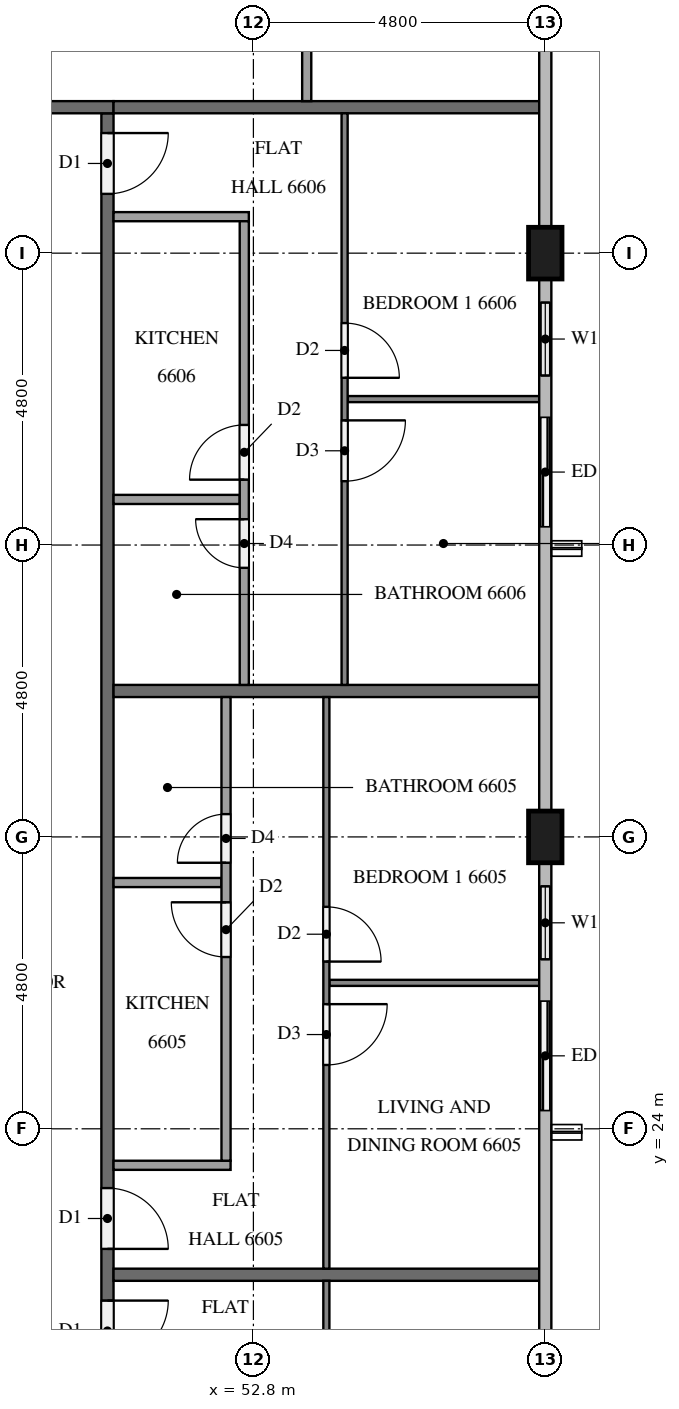
"""IFC4 building model, lengths in metres.
Left out: names, types, materials, properties, quantities, classifications, styles, units other than length and angle.
Written with IfcOpenShell. Run it as: python <this file> out.ifc"""

import sys

from ifc_helpers import new_model, si_unit, direction, frame, frame_2d, origin, origin_2d, place, context, subcontext, project, spatial, rectangle, extrude, element, fill, save


model = new_model("IFC4")
c1 = context("Model", 3, precision=1e-05, world=origin(), true_north=direction((0.0, 1.0)))
c2 = subcontext(c1, "Body", "Model", "MODEL_VIEW")
j1 = project(units=[si_unit("LENGTHUNIT", "METRE"), si_unit("PLANEANGLEUNIT", "RADIAN")], contexts=[c1])
p1 = place(None, origin())
s1 = spatial("IfcSite", under=j1, at=p1, CompositionType="ELEMENT")
p2 = place(p1, origin())
s2 = spatial("IfcBuilding", under=s1, at=p2, CompositionType="ELEMENT")
p3 = place(p2, frame((0.0, 0.0, 252.7)))
s3 = spatial("IfcBuildingStorey", under=s2, at=p3, CompositionType="ELEMENT", Elevation=252.7)
for number, where, z_axis, x_axis in (
    (1, (57.6, 28.8, 0.0), (0.0, 0.0, 1.0), (0.0, 1.0, 0.0)),
    (2, (57.6, 38.4, 0.0), (0.0, 0.0, 1.0), (0.0, 1.0, 0.0)),
):
    element("IfcColumn", number, at=place(p3, frame(where, z_axis=z_axis, x_axis=x_axis)), inside=s3, PredefinedType="COLUMN", context=c2, shape_type="SweptSolid", body=[
        extrude(rectangle(XDim=0.85, YDim=0.55, at=origin_2d()), origin(), (0.0, 0.0, 1.0), 3.2),
    ])
p4 = place(p3, frame((57.6, 24.0, 0.0), z_axis=(0.0, 0.0, 1.0), x_axis=(0.0, 1.0, 0.0)))
e3 = element("IfcWall", 3, at=p4, inside=s3, PredefinedType="SOLIDWALL", context=c2, shape_type="SweptSolid", body=[
    extrude(rectangle(XDim=4.375, YDim=0.15, at=frame_2d((2.188, 0.0))), origin(), (0.0, 0.0, 1.0), 3.2),
])
p5 = place(p4, frame((0.3, 0.0, 0.0)))
e4 = element("IfcOpeningElement", 4, at=p5, cuts=e3, PredefinedType="OPENING", context=c2, shape_type="SweptSolid", body=[
    extrude(rectangle(XDim=1.8, YDim=2.4, at=frame_2d((0.9, 1.2))), frame((0.0, 0.085, 0.0), z_axis=(0.0, -1.0, 0.0), x_axis=(1.0, 0.0, 0.0)), (0.0, 0.0, 1.0), 0.17),
])
p6 = place(p4, frame((2.788, 0.0, 0.9)))
e5 = element("IfcOpeningElement", 5, at=p6, cuts=e3, PredefinedType="OPENING", context=c2, shape_type="SweptSolid", body=[
    extrude(rectangle(XDim=1.2, YDim=1.4, at=frame_2d((0.6, 0.7))), frame((0.0, 0.085, 0.0), z_axis=(0.0, -1.0, 0.0), x_axis=(1.0, 0.0, 0.0)), (0.0, 0.0, 1.0), 0.17),
])
p7 = place(p3, frame((57.6, 33.6, 0.0), z_axis=(0.0, 0.0, 1.0), x_axis=(0.0, 1.0, 0.0)))
e6 = element("IfcWall", 6, at=p7, inside=s3, PredefinedType="SOLIDWALL", context=c2, shape_type="SweptSolid", body=[
    extrude(rectangle(XDim=4.375, YDim=0.15, at=frame_2d((2.188, 0.0))), origin(), (0.0, 0.0, 1.0), 3.2),
])
p8 = place(p7, frame((0.3, 0.0, 0.0)))
e7 = element("IfcOpeningElement", 7, at=p8, cuts=e6, PredefinedType="OPENING", context=c2, shape_type="SweptSolid", body=[
    extrude(rectangle(XDim=1.8, YDim=2.4, at=frame_2d((0.9, 1.2))), frame((0.0, 0.085, 0.0), z_axis=(0.0, -1.0, 0.0), x_axis=(1.0, 0.0, 0.0)), (0.0, 0.0, 1.0), 0.17),
])
p9 = place(p7, frame((2.788, 0.0, 0.9)))
e8 = element("IfcOpeningElement", 8, at=p9, cuts=e6, PredefinedType="OPENING", context=c2, shape_type="SweptSolid", body=[
    extrude(rectangle(XDim=1.2, YDim=1.4, at=frame_2d((0.6, 0.7))), frame((0.0, 0.085, 0.0), z_axis=(0.0, -1.0, 0.0), x_axis=(1.0, 0.0, 0.0)), (0.0, 0.0, 1.0), 0.17),
])
p10 = place(p3, frame((50.4, 40.7, 0.0), z_axis=(0.0, 0.0, 1.0), x_axis=(0.0, -1.0, 0.0)))
e9 = element("IfcWall", 9, at=p10, inside=s3, PredefinedType="PARTITIONING", context=c2, shape_type="SweptSolid", body=[
    extrude(rectangle(XDim=28.6, YDim=0.2, at=frame_2d((14.3, 0.0))), origin(), (0.0, 0.0, 1.0), 3.2),
])
p11 = place(p10, frame((19.525, 0.0, 0.0)))
e10 = element("IfcOpeningElement", 10, at=p11, cuts=e9, PredefinedType="OPENING", context=c2, shape_type="SweptSolid", body=[
    extrude(rectangle(XDim=1.0, YDim=2.1, at=frame_2d((0.5, 1.05))), frame((0.0, 0.11, 0.0), z_axis=(0.0, -1.0, 0.0), x_axis=(1.0, 0.0, 0.0)), (0.0, 0.0, 1.0), 0.22),
])
p12 = place(p10, frame((17.675, 0.0, 0.0)))
e11 = element("IfcOpeningElement", 11, at=p12, cuts=e9, PredefinedType="OPENING", context=c2, shape_type="SweptSolid", body=[
    extrude(rectangle(XDim=1.0, YDim=2.1, at=frame_2d((0.5, 1.05))), frame((0.0, 0.11, 0.0), z_axis=(0.0, -1.0, 0.0), x_axis=(1.0, 0.0, 0.0)), (0.0, 0.0, 1.0), 0.22),
])
p13 = place(p10, frame((0.325, 0.0, 0.0)))
e12 = element("IfcOpeningElement", 12, at=p13, cuts=e9, PredefinedType="OPENING", context=c2, shape_type="SweptSolid", body=[
    extrude(rectangle(XDim=1.0, YDim=2.1, at=frame_2d((0.5, 1.05))), frame((0.0, 0.11, 0.0), z_axis=(0.0, -1.0, 0.0), x_axis=(1.0, 0.0, 0.0)), (0.0, 0.0, 1.0), 0.22),
])
p14 = place(p3, frame((11.9, 40.8, 0.0), z_axis=(0.0, 0.0, 1.0), x_axis=(1.0, 0.0, 0.0)))
e13 = element("IfcWall", 13, at=p14, inside=s3, PredefinedType="PARTITIONING", context=c2, shape_type="SweptSolid", body=[
    extrude(rectangle(XDim=38.6, YDim=0.2, at=frame_2d((19.3, 0.0))), origin(), (0.0, 0.0, 1.0), 3.2),
])
p15 = place(p14, frame((31.725, 0.0, 0.0)))
e14 = element("IfcOpeningElement", 14, at=p15, cuts=e13, PredefinedType="OPENING", context=c2, shape_type="SweptSolid", body=[
    extrude(rectangle(XDim=1.0, YDim=2.1, at=frame_2d((0.5, 1.05))), frame((0.0, 0.11, 0.0), z_axis=(0.0, -1.0, 0.0), x_axis=(1.0, 0.0, 0.0)), (0.0, 0.0, 1.0), 0.22),
])
p16 = place(p14, frame((17.325, 0.0, 0.0)))
e15 = element("IfcOpeningElement", 15, at=p16, cuts=e13, PredefinedType="OPENING", context=c2, shape_type="SweptSolid", body=[
    extrude(rectangle(XDim=1.0, YDim=2.1, at=frame_2d((0.5, 1.05))), frame((0.0, 0.11, 0.0), z_axis=(0.0, -1.0, 0.0), x_axis=(1.0, 0.0, 0.0)), (0.0, 0.0, 1.0), 0.22),
])
p17 = place(p14, frame((0.525, 0.0, 0.0)))
e16 = element("IfcOpeningElement", 16, at=p17, cuts=e13, PredefinedType="OPENING", context=c2, shape_type="SweptSolid", body=[
    extrude(rectangle(XDim=1.0, YDim=2.1, at=frame_2d((0.5, 1.05))), frame((0.0, 0.11, 0.0), z_axis=(0.0, -1.0, 0.0), x_axis=(1.0, 0.0, 0.0)), (0.0, 0.0, 1.0), 0.22),
])
for number, where, z_axis, x_axis in (
    (17, (50.5, 21.6, 0.0), (0.0, 0.0, 1.0), (1.0, 0.0, 0.0)),
    (18, (50.5, 31.2, 0.0), (0.0, 0.0, 1.0), (1.0, 0.0, 0.0)),
    (19, (50.5, 40.8, 0.0), (0.0, 0.0, 1.0), (1.0, 0.0, 0.0)),
):
    element("IfcWall", number, at=place(p3, frame(where, z_axis=z_axis, x_axis=x_axis)), inside=s3, PredefinedType="PARTITIONING", context=c2, shape_type="SweptSolid", body=[
        extrude(rectangle(XDim=7.0, YDim=0.2, at=frame_2d((3.5, 0.0))), origin(), (0.0, 0.0, 1.0), 3.2),
    ])
p18 = place(p3, frame((54.0, 21.5, 0.0), z_axis=(0.0, 0.0, 1.0), x_axis=(0.0, -1.0, 0.0)))
e20 = element("IfcWall", 20, at=p18, inside=s3, PredefinedType="PARTITIONING", context=c2, shape_type="SweptSolid", body=[
    extrude(rectangle(XDim=16.279, YDim=0.1, at=frame_2d((8.139, 0.0))), origin(), (0.0, 0.0, 1.0), 3.2),
])
p19 = place(p18, frame((3.45, 0.0, 0.0)))
e21 = element("IfcOpeningElement", 21, at=p19, cuts=e20, PredefinedType="OPENING", context=c2, shape_type="SweptSolid", body=[
    extrude(rectangle(XDim=0.9, YDim=2.1, at=frame_2d((0.45, 1.05))), frame((0.0, 0.06, 0.0), z_axis=(0.0, -1.0, 0.0), x_axis=(1.0, 0.0, 0.0)), (0.0, 0.0, 1.0), 0.12),
])
p20 = place(p18, frame((5.05, 0.0, 0.0)))
e22 = element("IfcOpeningElement", 22, at=p20, cuts=e20, PredefinedType="OPENING", context=c2, shape_type="SweptSolid", body=[
    extrude(rectangle(XDim=0.9, YDim=2.1, at=frame_2d((0.45, 1.05))), frame((0.0, 0.06, 0.0), z_axis=(0.0, -1.0, 0.0), x_axis=(1.0, 0.0, 0.0)), (0.0, 0.0, 1.0), 0.12),
])
p21 = place(p18, frame((14.979, 0.0, 0.0)))
e23 = element("IfcOpeningElement", 23, at=p21, cuts=e20, PredefinedType="OPENING", context=c2, shape_type="SweptSolid", body=[
    extrude(rectangle(XDim=1.0, YDim=2.1, at=frame_2d((0.5, 1.05))), frame((0.0, 0.06, 0.0), z_axis=(0.0, -1.0, 0.0), x_axis=(1.0, 0.0, 0.0)), (0.0, 0.0, 1.0), 0.12),
])
p22 = place(p3, frame((54.05, 26.4, 0.0), z_axis=(0.0, 0.0, 1.0), x_axis=(1.0, 0.0, 0.0)))
e24 = element("IfcWall", 24, at=p22, inside=s3, PredefinedType="PARTITIONING", context=c2, shape_type="SweptSolid", body=[
    extrude(rectangle(XDim=3.45, YDim=0.1, at=frame_2d((1.725, 0.0))), origin(), (0.0, 0.0, 1.0), 3.2),
])
p23 = place(p3, frame((54.0, 31.1, 0.0), z_axis=(0.0, 0.0, 1.0), x_axis=(0.0, -1.0, 0.0)))
e25 = element("IfcWall", 25, at=p23, inside=s3, PredefinedType="PARTITIONING", context=c2, shape_type="SweptSolid", body=[
    extrude(rectangle(XDim=9.4, YDim=0.1, at=frame_2d((4.7, 0.0))), origin(), (0.0, 0.0, 1.0), 3.2),
])
p24 = place(p23, frame((5.05, 0.0, 0.0)))
e26 = element("IfcOpeningElement", 26, at=p24, cuts=e25, PredefinedType="OPENING", context=c2, shape_type="SweptSolid", body=[
    extrude(rectangle(XDim=1.0, YDim=2.1, at=frame_2d((0.5, 1.05))), frame((0.0, 0.06, 0.0), z_axis=(0.0, -1.0, 0.0), x_axis=(1.0, 0.0, 0.0)), (0.0, 0.0, 1.0), 0.12),
])
p25 = place(p23, frame((3.45, 0.0, 0.0)))
e27 = element("IfcOpeningElement", 27, at=p25, cuts=e25, PredefinedType="OPENING", context=c2, shape_type="SweptSolid", body=[
    extrude(rectangle(XDim=0.9, YDim=2.1, at=frame_2d((0.45, 1.05))), frame((0.0, 0.06, 0.0), z_axis=(0.0, -1.0, 0.0), x_axis=(1.0, 0.0, 0.0)), (0.0, 0.0, 1.0), 0.12),
])
p26 = place(p3, frame((50.5, 28.05, 0.0), z_axis=(0.0, 0.0, 1.0), x_axis=(1.0, 0.0, 0.0)))
e28 = element("IfcWall", 28, at=p26, inside=s3, PredefinedType="PARTITIONING", context=c2, shape_type="SweptSolid", body=[
    extrude(rectangle(XDim=1.775, YDim=0.15, at=frame_2d((0.887, 0.0))), origin(), (0.0, 0.0, 1.0), 3.2),
])
p27 = place(p3, frame((50.5, 23.4, 0.0), z_axis=(0.0, 0.0, 1.0), x_axis=(1.0, 0.0, 0.0)))
e29 = element("IfcWall", 29, at=p27, inside=s3, PredefinedType="PARTITIONING", context=c2, shape_type="SweptSolid", body=[
    extrude(rectangle(XDim=1.925, YDim=0.15, at=frame_2d((0.962, 0.0))), origin(), (0.0, 0.0, 1.0), 3.2),
])
p28 = place(p3, frame((52.35, 23.475, 0.0), z_axis=(0.0, 0.0, 1.0), x_axis=(0.0, 1.0, 0.0)))
e30 = element("IfcWall", 30, at=p28, inside=s3, PredefinedType="PARTITIONING", context=c2, shape_type="SweptSolid", body=[
    extrude(rectangle(XDim=7.625, YDim=0.15, at=frame_2d((3.812, 0.0))), origin(), (0.0, 0.0, 1.0), 3.2),
])
p29 = place(p28, frame((3.35, 0.0, 0.0)))
e31 = element("IfcOpeningElement", 31, at=p29, cuts=e30, PredefinedType="OPENING", context=c2, shape_type="SweptSolid", body=[
    extrude(rectangle(XDim=0.9, YDim=2.1, at=frame_2d((0.45, 1.05))), frame((0.0, 0.085, 0.0), z_axis=(0.0, -1.0, 0.0), x_axis=(1.0, 0.0, 0.0)), (0.0, 0.0, 1.0), 0.17),
])
p30 = place(p28, frame((4.9, 0.0, 0.0)))
e32 = element("IfcOpeningElement", 32, at=p30, cuts=e30, PredefinedType="OPENING", context=c2, shape_type="SweptSolid", body=[
    extrude(rectangle(XDim=0.8, YDim=2.1, at=frame_2d((0.4, 1.05))), frame((0.0, 0.085, 0.0), z_axis=(0.0, -1.0, 0.0), x_axis=(1.0, 0.0, 0.0)), (0.0, 0.0, 1.0), 0.17),
])
p31 = place(p3, frame((54.35, 36.0, 0.0), z_axis=(0.0, 0.0, 1.0), x_axis=(1.0, 0.0, 0.0)))
e33 = element("IfcWall", 33, at=p31, inside=s3, PredefinedType="PARTITIONING", context=c2, shape_type="SweptSolid", body=[
    extrude(rectangle(XDim=3.15, YDim=0.1, at=frame_2d((1.575, 0.0))), origin(), (0.0, 0.0, 1.0), 3.2),
])
p32 = place(p3, frame((54.3, 40.7, 0.0), z_axis=(0.0, 0.0, 1.0), x_axis=(0.0, -1.0, 0.0)))
e34 = element("IfcWall", 34, at=p32, inside=s3, PredefinedType="PARTITIONING", context=c2, shape_type="SweptSolid", body=[
    extrude(rectangle(XDim=9.4, YDim=0.1, at=frame_2d((4.7, 0.0))), origin(), (0.0, 0.0, 1.0), 3.2),
])
p33 = place(p32, frame((3.45, 0.0, 0.0)))
e35 = element("IfcOpeningElement", 35, at=p33, cuts=e34, PredefinedType="OPENING", context=c2, shape_type="SweptSolid", body=[
    extrude(rectangle(XDim=0.9, YDim=2.1, at=frame_2d((0.45, 1.05))), frame((0.0, 0.06, 0.0), z_axis=(0.0, -1.0, 0.0), x_axis=(1.0, 0.0, 0.0)), (0.0, 0.0, 1.0), 0.12),
])
p34 = place(p32, frame((5.05, 0.0, 0.0)))
e36 = element("IfcOpeningElement", 36, at=p34, cuts=e34, PredefinedType="OPENING", context=c2, shape_type="SweptSolid", body=[
    extrude(rectangle(XDim=1.0, YDim=2.1, at=frame_2d((0.5, 1.05))), frame((0.0, 0.06, 0.0), z_axis=(0.0, -1.0, 0.0), x_axis=(1.0, 0.0, 0.0)), (0.0, 0.0, 1.0), 0.12),
])
p35 = place(p3, frame((50.5, 34.35, 0.0), z_axis=(0.0, 0.0, 1.0), x_axis=(1.0, 0.0, 0.0)))
e37 = element("IfcWall", 37, at=p35, inside=s3, PredefinedType="PARTITIONING", context=c2, shape_type="SweptSolid", body=[
    extrude(rectangle(XDim=2.075, YDim=0.15, at=frame_2d((1.038, 0.0))), origin(), (0.0, 0.0, 1.0), 3.2),
])
p36 = place(p3, frame((50.5, 39.0, 0.0), z_axis=(0.0, 0.0, 1.0), x_axis=(1.0, 0.0, 0.0)))
e38 = element("IfcWall", 38, at=p36, inside=s3, PredefinedType="PARTITIONING", context=c2, shape_type="SweptSolid", body=[
    extrude(rectangle(XDim=2.225, YDim=0.15, at=frame_2d((1.113, 0.0))), origin(), (0.0, 0.0, 1.0), 3.2),
])
p37 = place(p3, frame((52.65, 31.3, 0.0), z_axis=(0.0, 0.0, 1.0), x_axis=(0.0, 1.0, 0.0)))
e39 = element("IfcWall", 39, at=p37, inside=s3, PredefinedType="PARTITIONING", context=c2, shape_type="SweptSolid", body=[
    extrude(rectangle(XDim=7.625, YDim=0.15, at=frame_2d((3.812, 0.0))), origin(), (0.0, 0.0, 1.0), 3.2),
])
p38 = place(p37, frame((3.375, 0.0, 0.0)))
e40 = element("IfcOpeningElement", 40, at=p38, cuts=e39, PredefinedType="OPENING", context=c2, shape_type="SweptSolid", body=[
    extrude(rectangle(XDim=0.9, YDim=2.1, at=frame_2d((0.45, 1.05))), frame((0.0, 0.085, 0.0), z_axis=(0.0, -1.0, 0.0), x_axis=(1.0, 0.0, 0.0)), (0.0, 0.0, 1.0), 0.17),
])
p39 = place(p37, frame((1.925, 0.0, 0.0)))
e41 = element("IfcOpeningElement", 41, at=p39, cuts=e39, PredefinedType="OPENING", context=c2, shape_type="SweptSolid", body=[
    extrude(rectangle(XDim=0.8, YDim=2.1, at=frame_2d((0.4, 1.05))), frame((0.0, 0.085, 0.0), z_axis=(0.0, -1.0, 0.0), x_axis=(1.0, 0.0, 0.0)), (0.0, 0.0, 1.0), 0.17),
])
p40 = place(p3, frame((53.677, 40.9, 0.0), z_axis=(0.0, 0.0, 1.0), x_axis=(0.0, 1.0, 0.0)))
e42 = element("IfcWall", 42, at=p40, inside=s3, PredefinedType="PARTITIONING", context=c2, shape_type="SweptSolid", body=[
    extrude(rectangle(XDim=2.975, YDim=0.15, at=frame_2d((1.488, 0.0))), origin(), (0.0, 0.0, 1.0), 3.2),
])
p41 = place(p5, origin())
e43 = element("IfcDoor", 43, at=p41, inside=s3, OperationType="SLIDING_TO_LEFT", PredefinedType="DOOR", context=c2, shape_type="SweptSolid", body=[
    extrude(rectangle(XDim=1.8, YDim=2.4, at=frame_2d((0.9, 1.2))), frame((0.0, 0.025, 0.0), z_axis=(0.0, -1.0, 0.0), x_axis=(1.0, 0.0, 0.0)), (0.0, 0.0, 1.0), 0.05),
])
fill(e4, e43)
p42 = place(p6, origin())
e44 = element("IfcWindow", 44, at=p42, inside=s3, PartitioningType="SINGLE_PANEL", PredefinedType="WINDOW", context=c2, shape_type="SweptSolid", body=[
    extrude(rectangle(XDim=1.2, YDim=1.4, at=frame_2d((0.6, 0.7))), frame((0.0, 0.03, 0.0), z_axis=(0.0, -1.0, 0.0), x_axis=(1.0, 0.0, 0.0)), (0.0, 0.0, 1.0), 0.06),
])
fill(e5, e44)
p43 = place(p8, origin())
e45 = element("IfcDoor", 45, at=p43, inside=s3, OperationType="SLIDING_TO_RIGHT", PredefinedType="DOOR", context=c2, shape_type="SweptSolid", body=[
    extrude(rectangle(XDim=1.8, YDim=2.4, at=frame_2d((0.9, 1.2))), frame((0.0, 0.025, 0.0), z_axis=(0.0, -1.0, 0.0), x_axis=(1.0, 0.0, 0.0)), (0.0, 0.0, 1.0), 0.05),
])
fill(e7, e45)
p44 = place(p9, origin())
e46 = element("IfcWindow", 46, at=p44, inside=s3, PartitioningType="SINGLE_PANEL", PredefinedType="WINDOW", context=c2, shape_type="SweptSolid", body=[
    extrude(rectangle(XDim=1.2, YDim=1.4, at=frame_2d((0.6, 0.7))), frame((0.0, 0.03, 0.0), z_axis=(0.0, -1.0, 0.0), x_axis=(1.0, 0.0, 0.0)), (0.0, 0.0, 1.0), 0.06),
])
fill(e8, e46)
p45 = place(p11, origin())
e47 = element("IfcDoor", 47, at=p45, inside=s3, OperationType="SINGLE_SWING_LEFT", PredefinedType="DOOR", context=c2, shape_type="SweptSolid", body=[
    extrude(rectangle(XDim=1.0, YDim=2.1, at=frame_2d((0.5, 1.05))), frame((0.0, 0.025, 0.0), z_axis=(0.0, -1.0, 0.0), x_axis=(1.0, 0.0, 0.0)), (0.0, 0.0, 1.0), 0.05),
])
fill(e10, e47)
p46 = place(p12, origin())
e48 = element("IfcDoor", 48, at=p46, inside=s3, OperationType="SINGLE_SWING_RIGHT", PredefinedType="DOOR", context=c2, shape_type="SweptSolid", body=[
    extrude(rectangle(XDim=1.0, YDim=2.1, at=frame_2d((0.5, 1.05))), frame((0.0, 0.025, 0.0), z_axis=(0.0, -1.0, 0.0), x_axis=(1.0, 0.0, 0.0)), (0.0, 0.0, 1.0), 0.05),
])
fill(e11, e48)
p47 = place(p13, origin())
e49 = element("IfcDoor", 49, at=p47, inside=s3, OperationType="SINGLE_SWING_LEFT", PredefinedType="DOOR", context=c2, shape_type="SweptSolid", body=[
    extrude(rectangle(XDim=1.0, YDim=2.1, at=frame_2d((0.5, 1.05))), frame((0.0, 0.025, 0.0), z_axis=(0.0, -1.0, 0.0), x_axis=(1.0, 0.0, 0.0)), (0.0, 0.0, 1.0), 0.05),
])
fill(e12, e49)
p48 = place(p24, origin())
e50 = element("IfcDoor", 50, at=p48, inside=s3, OperationType="SINGLE_SWING_LEFT", PredefinedType="DOOR", context=c2, shape_type="SweptSolid", body=[
    extrude(rectangle(XDim=1.0, YDim=2.1, at=frame_2d((0.5, 1.05))), frame((0.0, 0.025, 0.0), z_axis=(0.0, -1.0, 0.0), x_axis=(1.0, 0.0, 0.0)), (0.0, 0.0, 1.0), 0.05),
])
fill(e26, e50)
p49 = place(p25, origin())
e51 = element("IfcDoor", 51, at=p49, inside=s3, OperationType="SINGLE_SWING_RIGHT", PredefinedType="DOOR", context=c2, shape_type="SweptSolid", body=[
    extrude(rectangle(XDim=0.9, YDim=2.1, at=frame_2d((0.45, 1.05))), frame((0.0, 0.025, 0.0), z_axis=(0.0, -1.0, 0.0), x_axis=(1.0, 0.0, 0.0)), (0.0, 0.0, 1.0), 0.05),
])
fill(e27, e51)
p50 = place(p29, origin())
e52 = element("IfcDoor", 52, at=p50, inside=s3, OperationType="SINGLE_SWING_RIGHT", PredefinedType="DOOR", context=c2, shape_type="SweptSolid", body=[
    extrude(rectangle(XDim=0.9, YDim=2.1, at=frame_2d((0.45, 1.05))), frame((0.0, 0.025, 0.0), z_axis=(0.0, -1.0, 0.0), x_axis=(1.0, 0.0, 0.0)), (0.0, 0.0, 1.0), 0.05),
])
fill(e31, e52)
p51 = place(p30, origin())
e53 = element("IfcDoor", 53, at=p51, inside=s3, OperationType="SINGLE_SWING_LEFT", PredefinedType="DOOR", context=c2, shape_type="SweptSolid", body=[
    extrude(rectangle(XDim=0.8, YDim=2.1, at=frame_2d((0.4, 1.05))), frame((0.0, 0.025, 0.0), z_axis=(0.0, -1.0, 0.0), x_axis=(1.0, 0.0, 0.0)), (0.0, 0.0, 1.0), 0.05),
])
fill(e32, e53)
p52 = place(p33, origin())
e54 = element("IfcDoor", 54, at=p52, inside=s3, OperationType="SINGLE_SWING_RIGHT", PredefinedType="DOOR", context=c2, shape_type="SweptSolid", body=[
    extrude(rectangle(XDim=0.9, YDim=2.1, at=frame_2d((0.45, 1.05))), frame((0.0, 0.025, 0.0), z_axis=(0.0, -1.0, 0.0), x_axis=(1.0, 0.0, 0.0)), (0.0, 0.0, 1.0), 0.05),
])
fill(e35, e54)
p53 = place(p34, origin())
e55 = element("IfcDoor", 55, at=p53, inside=s3, OperationType="SINGLE_SWING_LEFT", PredefinedType="DOOR", context=c2, shape_type="SweptSolid", body=[
    extrude(rectangle(XDim=1.0, YDim=2.1, at=frame_2d((0.5, 1.05))), frame((0.0, 0.025, 0.0), z_axis=(0.0, -1.0, 0.0), x_axis=(1.0, 0.0, 0.0)), (0.0, 0.0, 1.0), 0.05),
])
fill(e36, e55)
p54 = place(p38, origin())
e56 = element("IfcDoor", 56, at=p54, inside=s3, OperationType="SINGLE_SWING_LEFT", PredefinedType="DOOR", context=c2, shape_type="SweptSolid", body=[
    extrude(rectangle(XDim=0.9, YDim=2.1, at=frame_2d((0.45, 1.05))), frame((0.0, 0.025, 0.0), z_axis=(0.0, -1.0, 0.0), x_axis=(1.0, 0.0, 0.0)), (0.0, 0.0, 1.0), 0.05),
])
fill(e40, e56)
p55 = place(p39, origin())
e57 = element("IfcDoor", 57, at=p55, inside=s3, OperationType="SINGLE_SWING_RIGHT", PredefinedType="DOOR", context=c2, shape_type="SweptSolid", body=[
    extrude(rectangle(XDim=0.8, YDim=2.1, at=frame_2d((0.4, 1.05))), frame((0.0, 0.025, 0.0), z_axis=(0.0, -1.0, 0.0), x_axis=(1.0, 0.0, 0.0)), (0.0, 0.0, 1.0), 0.05),
])
fill(e41, e57)
save(model, sys.argv[1])
